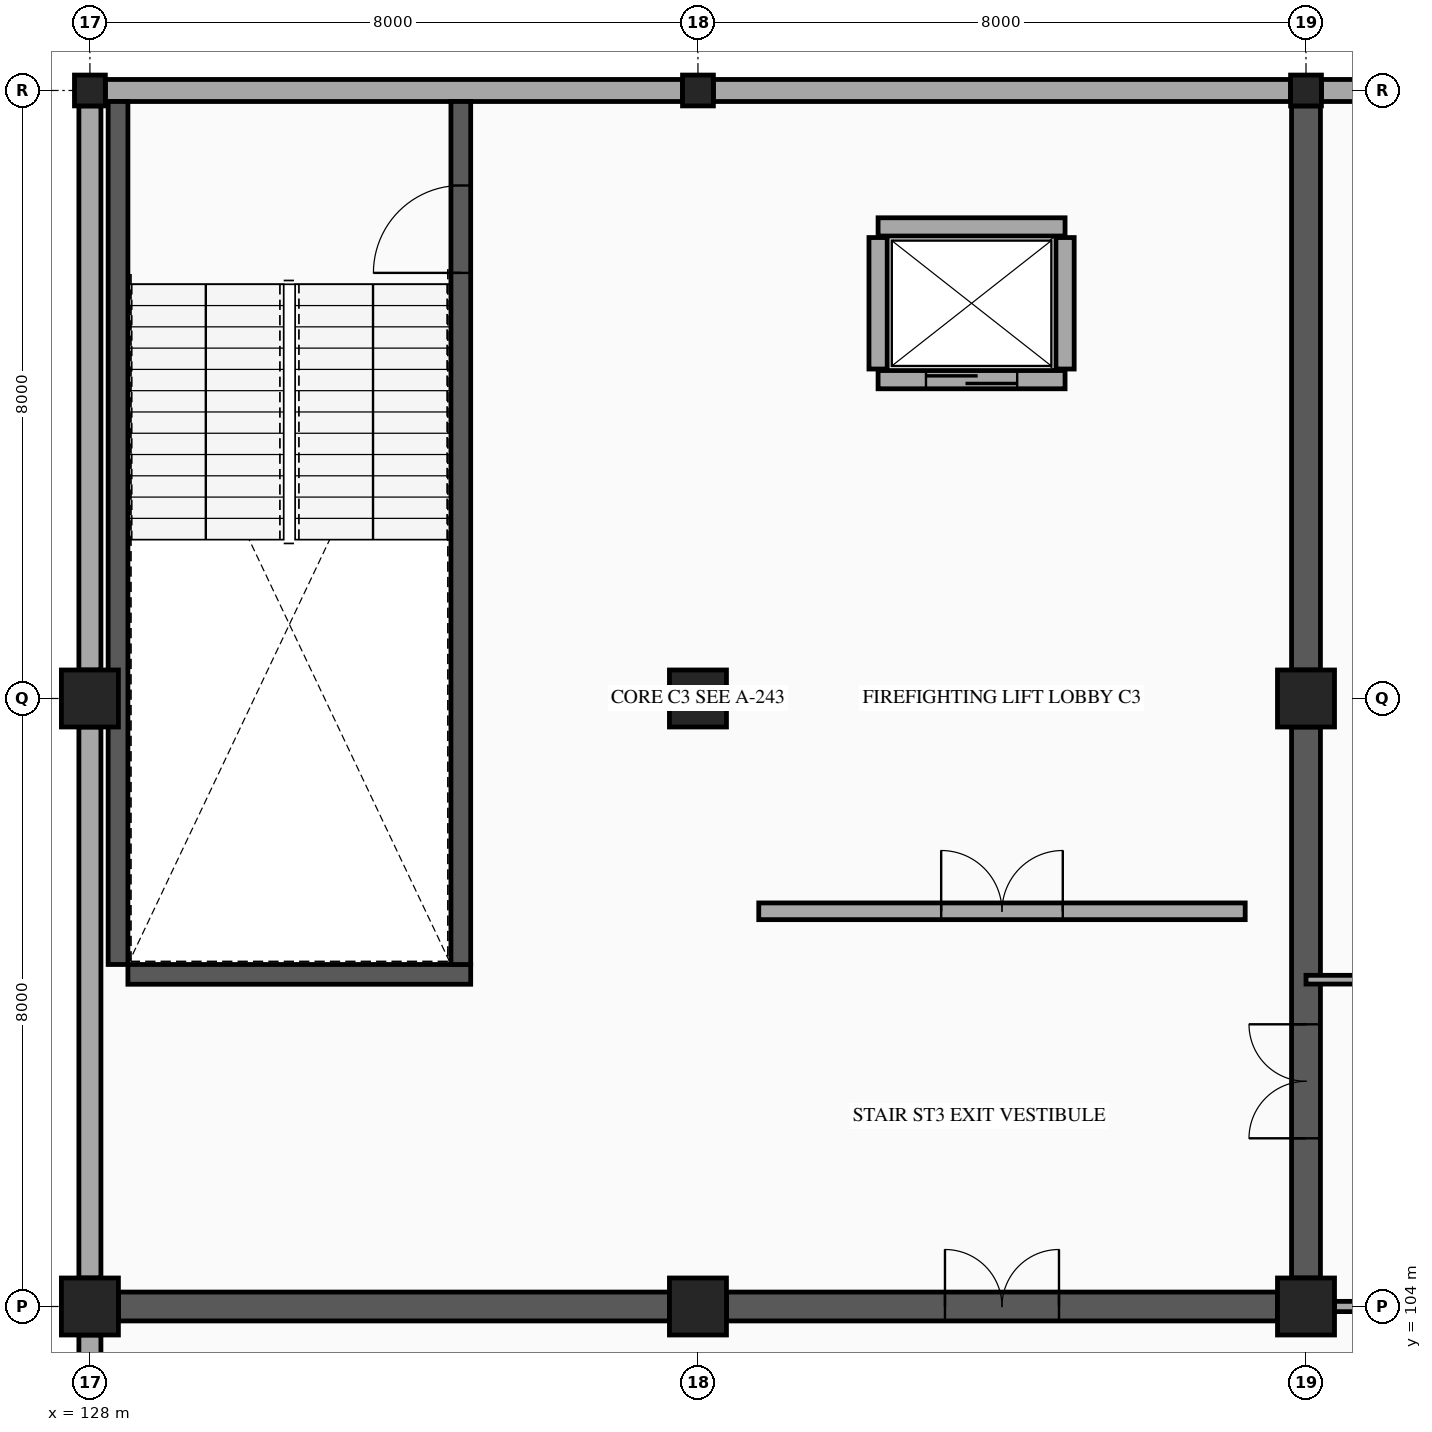
"""IFC4 building model, lengths in metres.
Left out: names, types, materials, properties, quantities, classifications, styles, units other than length and angle.
Written with IfcOpenShell. Run it as: python <this file> out.ifc"""

import sys

from ifc_helpers import new_model, si_unit, direction, frame, frame_2d, origin, origin_2d, place, context, subcontext, project, spatial, rectangle, hollow_rectangle, extrude, element, fill, save


model = new_model("IFC4")
c1 = context("Model", 3, precision=1e-05, world=origin(), true_north=direction((0.0, 1.0)))
c2 = subcontext(c1, "Body", "Model", "MODEL_VIEW")
j1 = project(units=[si_unit("LENGTHUNIT", "METRE"), si_unit("PLANEANGLEUNIT", "RADIAN")], contexts=[c1])
p1 = place(None, origin())
s1 = spatial("IfcSite", under=j1, at=p1, CompositionType="ELEMENT")
p2 = place(p1, origin())
s2 = spatial("IfcBuilding", under=s1, at=p2, CompositionType="ELEMENT")
p3 = place(p2, frame((0.0, 0.0, 23.9)))
s3 = spatial("IfcBuildingStorey", under=s2, at=p3, CompositionType="ELEMENT", Elevation=23.9)
for number, where, z_axis, x_axis in (
    (1, (128.0, 104.0, 0.0), (0.0, 0.0, 1.0), (1.0, 0.0, 0.0)),
    (2, (128.0, 112.0, 0.0), (0.0, 0.0, 1.0), (1.0, 0.0, 0.0)),
):
    element("IfcColumn", number, at=place(p3, frame(where, z_axis=z_axis, x_axis=x_axis)), inside=s3, PredefinedType="COLUMN", context=c2, shape_type="SweptSolid", body=[
        extrude(rectangle(XDim=0.75, YDim=0.75, at=origin_2d()), origin(), (0.0, 0.0, 1.0), 4.5),
    ])
p4 = place(p3, frame((128.0, 120.0, 0.0), z_axis=(0.0, 0.0, 1.0), x_axis=(1.0, 0.0, 0.0)))
e3 = element("IfcColumn", 3, at=p4, inside=s3, PredefinedType="COLUMN", context=c2, shape_type="SweptSolid", body=[
    extrude(hollow_rectangle(XDim=0.406, YDim=0.406, WallThickness=0.015, InnerFilletRadius=0.015, OuterFilletRadius=0.029, at=origin_2d()), origin(), (0.0, 0.0, 1.0), 4.5),
])
for number, where, z_axis, x_axis in (
    (4, (136.0, 104.0, 0.0), (0.0, 0.0, 1.0), (1.0, 0.0, 0.0)),
    (5, (136.0, 112.0, 0.0), (0.0, 0.0, 1.0), (1.0, 0.0, 0.0)),
):
    element("IfcColumn", number, at=place(p3, frame(where, z_axis=z_axis, x_axis=x_axis)), inside=s3, PredefinedType="COLUMN", context=c2, shape_type="SweptSolid", body=[
        extrude(rectangle(XDim=0.75, YDim=0.75, at=origin_2d()), origin(), (0.0, 0.0, 1.0), 4.5),
    ])
p5 = place(p3, frame((136.0, 120.0, 0.0), z_axis=(0.0, 0.0, 1.0), x_axis=(1.0, 0.0, 0.0)))
e6 = element("IfcColumn", 6, at=p5, inside=s3, PredefinedType="COLUMN", context=c2, shape_type="SweptSolid", body=[
    extrude(hollow_rectangle(XDim=0.406, YDim=0.406, WallThickness=0.015, InnerFilletRadius=0.015, OuterFilletRadius=0.029, at=origin_2d()), origin(), (0.0, 0.0, 1.0), 4.5),
])
for number, where, z_axis, x_axis in (
    (7, (144.0, 104.0, 0.0), (0.0, 0.0, 1.0), (1.0, 0.0, 0.0)),
    (8, (144.0, 112.0, 0.0), (0.0, 0.0, 1.0), (1.0, 0.0, 0.0)),
):
    element("IfcColumn", number, at=place(p3, frame(where, z_axis=z_axis, x_axis=x_axis)), inside=s3, PredefinedType="COLUMN", context=c2, shape_type="SweptSolid", body=[
        extrude(rectangle(XDim=0.75, YDim=0.75, at=origin_2d()), origin(), (0.0, 0.0, 1.0), 4.5),
    ])
p6 = place(p3, frame((144.0, 120.0, 0.0), z_axis=(0.0, 0.0, 1.0), x_axis=(1.0, 0.0, 0.0)))
e9 = element("IfcColumn", 9, at=p6, inside=s3, PredefinedType="COLUMN", context=c2, shape_type="SweptSolid", body=[
    extrude(hollow_rectangle(XDim=0.406, YDim=0.406, WallThickness=0.015, InnerFilletRadius=0.015, OuterFilletRadius=0.029, at=origin_2d()), origin(), (0.0, 0.0, 1.0), 4.5),
])
p7 = place(p3, frame((128.0, 96.375, 0.0), z_axis=(0.0, 0.0, 1.0), x_axis=(0.0, 1.0, 0.0)))
e10 = element("IfcWall", 10, at=p7, inside=s3, PredefinedType="STANDARD", context=c2, shape_type="SweptSolid", body=[
    extrude(rectangle(XDim=7.25, YDim=0.29, at=frame_2d((3.625, 0.0))), origin(), (0.0, 0.0, 1.0), 3.48),
])
p8 = place(p7, frame((2.475, 0.0, 0.8)))
e11 = element("IfcOpeningElement", 11, at=p8, cuts=e10, PredefinedType="OPENING", context=c2, shape_type="SweptSolid", body=[
    extrude(rectangle(XDim=2.3, YDim=1.75, at=frame_2d((1.15, 0.875))), frame((0.0, 0.155, 0.0), z_axis=(0.0, -1.0, 0.0), x_axis=(1.0, 0.0, 0.0)), (0.0, 0.0, 1.0), 0.31),
])
p9 = place(p3, frame((128.0, 104.375, 0.0), z_axis=(0.0, 0.0, 1.0), x_axis=(0.0, 1.0, 0.0)))
e12 = element("IfcWall", 12, at=p9, inside=s3, PredefinedType="STANDARD", context=c2, shape_type="SweptSolid", body=[
    extrude(rectangle(XDim=7.25, YDim=0.29, at=frame_2d((3.625, 0.0))), origin(), (0.0, 0.0, 1.0), 3.48),
])
p10 = place(p3, frame((128.0, 112.375, 0.0), z_axis=(0.0, 0.0, 1.0), x_axis=(0.0, 1.0, 0.0)))
e13 = element("IfcWall", 13, at=p10, inside=s3, PredefinedType="STANDARD", context=c2, shape_type="SweptSolid", body=[
    extrude(rectangle(XDim=7.422, YDim=0.29, at=frame_2d((3.711, 0.0))), origin(), (0.0, 0.0, 1.0), 3.48),
])
for number, where, z_axis, x_axis in (
    (14, (128.203, 120.0, 0.0), (0.0, 0.0, 1.0), (1.0, 0.0, 0.0)),
    (15, (136.203, 120.0, 0.0), (0.0, 0.0, 1.0), (1.0, 0.0, 0.0)),
):
    element("IfcWall", number, at=place(p3, frame(where, z_axis=z_axis, x_axis=x_axis)), inside=s3, PredefinedType="STANDARD", context=c2, shape_type="SweptSolid", body=[
        extrude(rectangle(XDim=7.594, YDim=0.29, at=frame_2d((3.797, 0.0))), origin(), (0.0, 0.0, 1.0), 3.48),
    ])
p11 = place(p3, frame((144.203, 120.0, 0.0), z_axis=(0.0, 0.0, 1.0), x_axis=(1.0, 0.0, 0.0)))
e16 = element("IfcWall", 16, at=p11, inside=s3, PredefinedType="STANDARD", context=c2, shape_type="SweptSolid", body=[
    extrude(rectangle(XDim=7.594, YDim=0.29, at=frame_2d((3.797, 0.0))), origin(), (0.0, 0.0, 1.0), 3.48),
])
p12 = place(p11, frame((2.647, 0.0, 0.8)))
e17 = element("IfcOpeningElement", 17, at=p12, cuts=e16, PredefinedType="OPENING", context=c2, shape_type="SweptSolid", body=[
    extrude(rectangle(XDim=2.3, YDim=1.75, at=frame_2d((1.15, 0.875))), frame((0.0, 0.155, 0.0), z_axis=(0.0, -1.0, 0.0), x_axis=(1.0, 0.0, 0.0)), (0.0, 0.0, 1.0), 0.31),
])
p13 = place(p3, frame((128.5, 108.37, 0.0), z_axis=(0.0, 0.0, 1.0), x_axis=(1.0, 0.0, 0.0)))
e18 = element("IfcWall", 18, at=p13, inside=s3, PredefinedType="SHEAR", context=c2, shape_type="SweptSolid", body=[
    extrude(rectangle(XDim=4.51, YDim=0.26, at=frame_2d((2.255, 0.0))), origin(), (0.0, 0.0, 1.0), 4.28),
])
p14 = place(p3, frame((128.37, 108.5, 0.0), z_axis=(0.0, 0.0, 1.0), x_axis=(0.0, 1.0, 0.0)))
e19 = element("IfcWall", 19, at=p14, inside=s3, PredefinedType="SHEAR", context=c2, shape_type="SweptSolid", body=[
    extrude(rectangle(XDim=11.355, YDim=0.26, at=frame_2d((5.677, 0.0))), origin(), (0.0, 0.0, 1.0), 4.28),
])
p15 = place(p3, frame((132.88, 108.5, 0.0), z_axis=(0.0, 0.0, 1.0), x_axis=(0.0, 1.0, 0.0)))
e20 = element("IfcWall", 20, at=p15, inside=s3, PredefinedType="SHEAR", context=c2, shape_type="SweptSolid", body=[
    extrude(rectangle(XDim=11.355, YDim=0.26, at=frame_2d((5.677, 0.0))), origin(), (0.0, 0.0, 1.0), 4.28),
])
p16 = place(p15, frame((9.1, 0.0, 0.0)))
e21 = element("IfcOpeningElement", 21, at=p16, cuts=e20, PredefinedType="OPENING", context=c2, shape_type="SweptSolid", body=[
    extrude(rectangle(XDim=1.15, YDim=2.15, at=frame_2d((0.575, 1.075))), frame((0.0, 0.14, 0.0), z_axis=(0.0, -1.0, 0.0), x_axis=(1.0, 0.0, 0.0)), (0.0, 0.0, 1.0), 0.28),
])
p17 = place(p3, frame((128.375, 104.0, 0.0), z_axis=(0.0, 0.0, 1.0), x_axis=(1.0, 0.0, 0.0)))
e22 = element("IfcWall", 22, at=p17, inside=s3, PredefinedType="SHEAR", context=c2, shape_type="SweptSolid", body=[
    extrude(rectangle(XDim=7.25, YDim=0.38, at=frame_2d((3.625, 0.0))), origin(), (0.0, 0.0, 1.0), 4.28),
])
p18 = place(p3, frame((136.375, 104.0, 0.0), z_axis=(0.0, 0.0, 1.0), x_axis=(1.0, 0.0, 0.0)))
e23 = element("IfcWall", 23, at=p18, inside=s3, PredefinedType="SHEAR", context=c2, shape_type="SweptSolid", body=[
    extrude(rectangle(XDim=7.25, YDim=0.38, at=frame_2d((3.625, 0.0))), origin(), (0.0, 0.0, 1.0), 4.28),
])
p19 = place(p18, frame((2.875, 0.0, 0.0)))
e24 = element("IfcOpeningElement", 24, at=p19, cuts=e23, PredefinedType="OPENING", context=c2, shape_type="SweptSolid", body=[
    extrude(rectangle(XDim=1.5, YDim=2.15, at=frame_2d((0.75, 1.075))), frame((0.0, 0.2, 0.0), z_axis=(0.0, -1.0, 0.0), x_axis=(1.0, 0.0, 0.0)), (0.0, 0.0, 1.0), 0.4),
])
p20 = place(p3, frame((144.0, 104.375, 0.0), z_axis=(0.0, 0.0, 1.0), x_axis=(0.0, 1.0, 0.0)))
e25 = element("IfcWall", 25, at=p20, inside=s3, PredefinedType="SHEAR", context=c2, shape_type="SweptSolid", body=[
    extrude(rectangle(XDim=7.25, YDim=0.38, at=frame_2d((3.625, 0.0))), origin(), (0.0, 0.0, 1.0), 4.28),
])
p21 = place(p20, frame((1.838, 0.0, 0.0)))
e26 = element("IfcOpeningElement", 26, at=p21, cuts=e25, PredefinedType="OPENING", context=c2, shape_type="SweptSolid", body=[
    extrude(rectangle(XDim=1.5, YDim=2.15, at=frame_2d((0.75, 1.075))), frame((0.0, 0.2, 0.0), z_axis=(0.0, -1.0, 0.0), x_axis=(1.0, 0.0, 0.0)), (0.0, 0.0, 1.0), 0.4),
])
p22 = place(p3, frame((144.0, 112.375, 0.0), z_axis=(0.0, 0.0, 1.0), x_axis=(0.0, 1.0, 0.0)))
e27 = element("IfcWall", 27, at=p22, inside=s3, PredefinedType="SHEAR", context=c2, shape_type="SweptSolid", body=[
    extrude(rectangle(XDim=7.422, YDim=0.38, at=frame_2d((3.711, 0.0))), origin(), (0.0, 0.0, 1.0), 4.28),
])
p23 = place(p3, frame((138.37, 116.195, 0.0), z_axis=(0.0, 0.0, 1.0), x_axis=(1.0, 0.0, 0.0)))
e28 = element("IfcWall", 28, at=p23, inside=s3, PredefinedType="PARTITIONING", context=c2, shape_type="SweptSolid", body=[
    extrude(rectangle(XDim=2.46, YDim=0.24, at=frame_2d((1.23, 0.0))), origin(), (0.0, 0.0, 1.0), 4.28),
])
p24 = place(p23, frame((0.63, 0.0, 0.0)))
e29 = element("IfcOpeningElement", 29, at=p24, cuts=e28, PredefinedType="OPENING", context=c2, shape_type="SweptSolid", body=[
    extrude(rectangle(XDim=1.2, YDim=2.15, at=frame_2d((0.6, 1.075))), frame((0.0, 0.13, 0.0), z_axis=(0.0, -1.0, 0.0), x_axis=(1.0, 0.0, 0.0)), (0.0, 0.0, 1.0), 0.26),
])
p25 = place(p3, frame((138.37, 118.205, 0.0), z_axis=(0.0, 0.0, 1.0), x_axis=(1.0, 0.0, 0.0)))
e30 = element("IfcWall", 30, at=p25, inside=s3, PredefinedType="PARTITIONING", context=c2, shape_type="SweptSolid", body=[
    extrude(rectangle(XDim=2.46, YDim=0.24, at=frame_2d((1.23, 0.0))), origin(), (0.0, 0.0, 1.0), 4.28),
])
for number, where, z_axis, x_axis in (
    (31, (138.37, 116.335, 0.0), (0.0, 0.0, 1.0), (0.0, 1.0, 0.0)),
    (32, (140.83, 116.335, 0.0), (0.0, 0.0, 1.0), (0.0, 1.0, 0.0)),
):
    element("IfcWall", number, at=place(p3, frame(where, z_axis=z_axis, x_axis=x_axis)), inside=s3, PredefinedType="PARTITIONING", context=c2, shape_type="SweptSolid", body=[
        extrude(rectangle(XDim=1.73, YDim=0.24, at=frame_2d((0.865, 0.0))), origin(), (0.0, 0.0, 1.0), 4.28),
    ])
p26 = place(p3, frame((136.8, 109.2, 0.0), z_axis=(0.0, 0.0, 1.0), x_axis=(1.0, 0.0, 0.0)))
e33 = element("IfcWall", 33, at=p26, inside=s3, PredefinedType="PARTITIONING", context=c2, shape_type="SweptSolid", body=[
    extrude(rectangle(XDim=6.4, YDim=0.22, at=frame_2d((3.2, 0.0))), origin(), (0.0, 0.0, 1.0), 3.48),
])
p27 = place(p26, frame((2.4, 0.0, 0.0)))
e34 = element("IfcOpeningElement", 34, at=p27, cuts=e33, PredefinedType="OPENING", context=c2, shape_type="SweptSolid", body=[
    extrude(rectangle(XDim=1.6, YDim=2.15, at=frame_2d((0.8, 1.075))), frame((0.0, 0.12, 0.0), z_axis=(0.0, -1.0, 0.0), x_axis=(1.0, 0.0, 0.0)), (0.0, 0.0, 1.0), 0.24),
])
p28 = place(p3, frame((144.375, 104.0, 0.0), z_axis=(0.0, 0.0, 1.0), x_axis=(1.0, 0.0, 0.0)))
e35 = element("IfcWall", 35, at=p28, inside=s3, PredefinedType="PARTITIONING", context=c2, shape_type="SweptSolid", body=[
    extrude(rectangle(XDim=3.025, YDim=0.135, at=frame_2d((1.512, 0.0))), origin(), (0.0, 0.0, 1.0), 3.48),
])
p29 = place(p3, frame((144.0, 108.3, 0.0), z_axis=(0.0, 0.0, 1.0), x_axis=(1.0, 0.0, 0.0)))
e36 = element("IfcWall", 36, at=p29, inside=s3, PredefinedType="PARTITIONING", context=c2, shape_type="SweptSolid", body=[
    extrude(rectangle(XDim=31.85, YDim=0.115, at=frame_2d((15.925, 0.0))), origin(), (0.0, 0.0, 1.0), 3.48),
])
p30 = place(p29, frame((27.53, 0.0, 0.0)))
e37 = element("IfcOpeningElement", 37, at=p30, cuts=e36, PredefinedType="OPENING", context=c2, shape_type="SweptSolid", body=[
    extrude(rectangle(XDim=0.95, YDim=2.1, at=frame_2d((0.475, 1.05))), frame((0.0, 0.067, 0.0), z_axis=(0.0, -1.0, 0.0), x_axis=(1.0, 0.0, 0.0)), (0.0, 0.0, 1.0), 0.135),
])
p31 = place(p16, origin())
e38 = element("IfcDoor", 38, at=p31, inside=s3, OperationType="SINGLE_SWING_LEFT", PredefinedType="DOOR", context=c2, shape_type="SweptSolid", body=[
    extrude(rectangle(XDim=1.15, YDim=2.15, at=frame_2d((0.575, 1.075))), frame((0.0, 0.025, 0.0), z_axis=(0.0, -1.0, 0.0), x_axis=(1.0, 0.0, 0.0)), (0.0, 0.0, 1.0), 0.05),
])
fill(e21, e38)
p32 = place(p19, origin())
e39 = element("IfcDoor", 39, at=p32, inside=s3, OperationType="DOUBLE_DOOR_SINGLE_SWING", PredefinedType="DOOR", context=c2, shape_type="SweptSolid", body=[
    extrude(rectangle(XDim=1.5, YDim=2.15, at=frame_2d((0.75, 1.075))), frame((0.0, 0.025, 0.0), z_axis=(0.0, -1.0, 0.0), x_axis=(1.0, 0.0, 0.0)), (0.0, 0.0, 1.0), 0.05),
])
fill(e24, e39)
p33 = place(p21, origin())
e40 = element("IfcDoor", 40, at=p33, inside=s3, OperationType="DOUBLE_DOOR_SINGLE_SWING", PredefinedType="DOOR", context=c2, shape_type="SweptSolid", body=[
    extrude(rectangle(XDim=1.5, YDim=2.15, at=frame_2d((0.75, 1.075))), frame((0.0, 0.025, 0.0), z_axis=(0.0, -1.0, 0.0), x_axis=(1.0, 0.0, 0.0)), (0.0, 0.0, 1.0), 0.05),
])
fill(e26, e40)
p34 = place(p24, origin())
e41 = element("IfcDoor", 41, at=p34, inside=s3, OperationType="SLIDING_TO_LEFT", PredefinedType="DOOR", context=c2, shape_type="SweptSolid", body=[
    extrude(rectangle(XDim=1.2, YDim=2.15, at=frame_2d((0.6, 1.075))), frame((0.0, 0.025, 0.0), z_axis=(0.0, -1.0, 0.0), x_axis=(1.0, 0.0, 0.0)), (0.0, 0.0, 1.0), 0.05),
])
fill(e29, e41)
p35 = place(p27, origin())
e42 = element("IfcDoor", 42, at=p35, inside=s3, OperationType="DOUBLE_DOOR_SINGLE_SWING", PredefinedType="DOOR", context=c2, shape_type="SweptSolid", body=[
    extrude(rectangle(XDim=1.6, YDim=2.15, at=frame_2d((0.8, 1.075))), frame((0.0, 0.025, 0.0), z_axis=(0.0, -1.0, 0.0), x_axis=(1.0, 0.0, 0.0)), (0.0, 0.0, 1.0), 0.05),
])
fill(e34, e42)
save(model, sys.argv[1])
